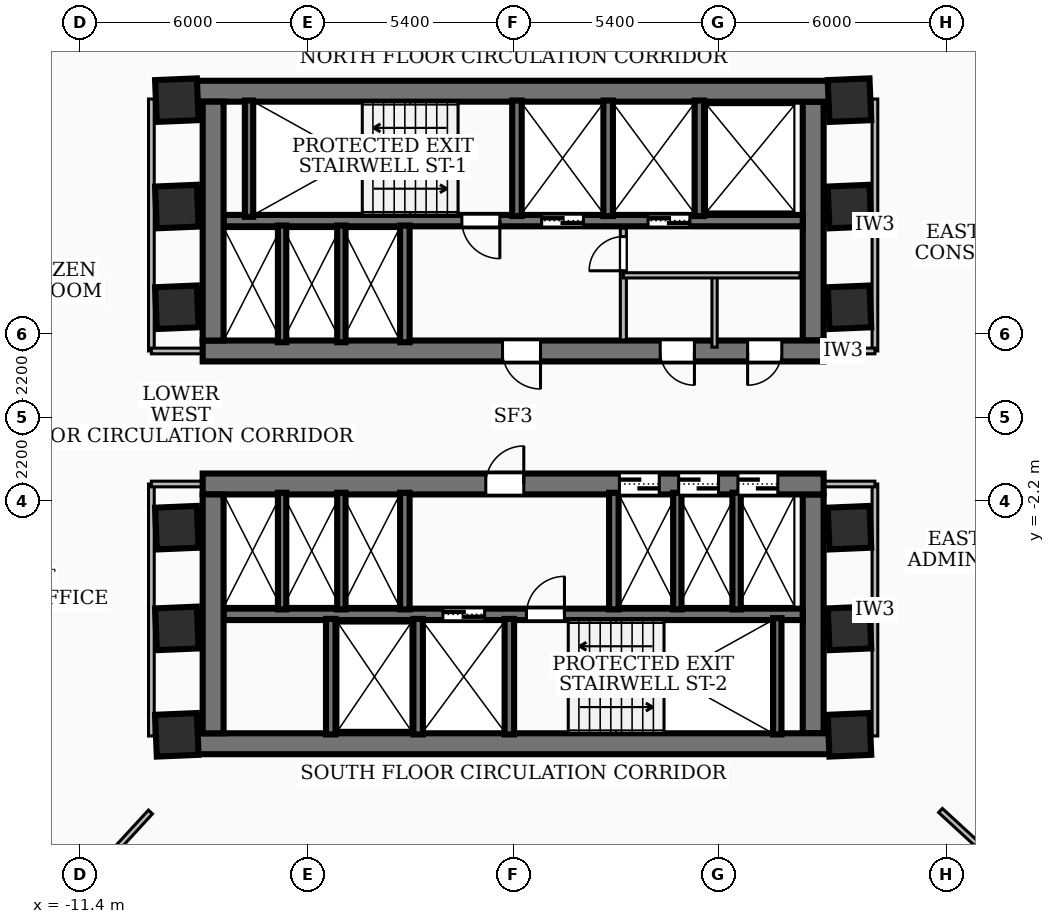
"""IFC4 building model, lengths in metres.
Left out: names, types, materials, properties, quantities, classifications, styles, units other than length and angle.
Written with IfcOpenShell. Run it as: python <this file> out.ifc"""

import sys

from ifc_helpers import new_model, si_unit, direction, frame, frame_2d, origin, origin_2d, place, context, subcontext, project, spatial, rectangle, extrude, element, fill, save


model = new_model("IFC4")
c1 = context("Model", 3, precision=1e-05, world=origin(), true_north=direction((0.0, 1.0)))
c2 = subcontext(c1, "Body", "Model", "MODEL_VIEW")
j1 = project(units=[si_unit("LENGTHUNIT", "METRE"), si_unit("PLANEANGLEUNIT", "RADIAN")], contexts=[c1])
p1 = place(None, origin())
s1 = spatial("IfcSite", under=j1, at=p1, CompositionType="ELEMENT")
p2 = place(p1, origin())
s2 = spatial("IfcBuilding", under=s1, at=p2, CompositionType="ELEMENT")
p3 = place(p2, frame((0.0, 0.0, 42.48)))
s3 = spatial("IfcBuildingStorey", under=s2, at=p3, CompositionType="ELEMENT", Elevation=42.48)
p4 = place(p3, frame((-8.78, 8.585, 0.0), z_axis=(0.0, 0.0, 1.0), x_axis=(1.0, 0.0, 0.0)))
e1 = element("IfcWall", 1, at=p4, inside=s3, PredefinedType="SHEAR", context=c2, shape_type="SweptSolid", body=[
    extrude(rectangle(XDim=17.56, YDim=0.55, at=frame_2d((8.78, 0.0))), origin(), (0.0, 0.0, 1.0), 3.34),
])
p5 = place(p3, frame((8.17, 1.75, 0.0), z_axis=(0.0, 0.0, 1.0), x_axis=(-1.0, 0.0, 0.0)))
e2 = element("IfcWall", 2, at=p5, inside=s3, PredefinedType="SHEAR", context=c2, shape_type="SweptSolid", body=[
    extrude(rectangle(XDim=16.34, YDim=0.55, at=frame_2d((8.17, 0.0))), origin(), (0.0, 0.0, 1.0), 3.34),
])
p6 = place(p5, frame((7.45, 0.0, 0.0)))
e3 = element("IfcOpeningElement", 3, at=p6, cuts=e2, PredefinedType="OPENING", context=c2, shape_type="SweptSolid", body=[
    extrude(rectangle(XDim=1.0, YDim=2.1, at=frame_2d((0.5, 1.05))), frame((0.0, 0.285, 0.0), z_axis=(0.0, -1.0, 0.0), x_axis=(1.0, 0.0, 0.0)), (0.0, 0.0, 1.0), 0.57),
])
p7 = place(p5, frame((3.4, 0.0, 0.0)))
e4 = element("IfcOpeningElement", 4, at=p7, cuts=e2, PredefinedType="OPENING", context=c2, shape_type="SweptSolid", body=[
    extrude(rectangle(XDim=0.9, YDim=2.06, at=frame_2d((0.45, 1.03))), frame((0.0, 0.285, 0.0), z_axis=(0.0, -1.0, 0.0), x_axis=(1.0, 0.0, 0.0)), (0.0, 0.0, 1.0), 0.57),
])
p8 = place(p5, frame((1.1, 0.0, 0.0)))
e5 = element("IfcOpeningElement", 5, at=p8, cuts=e2, PredefinedType="OPENING", context=c2, shape_type="SweptSolid", body=[
    extrude(rectangle(XDim=0.9, YDim=2.06, at=frame_2d((0.45, 1.03))), frame((0.0, 0.285, 0.0), z_axis=(0.0, -1.0, 0.0), x_axis=(1.0, 0.0, 0.0)), (0.0, 0.0, 1.0), 0.57),
])
for number, where, z_axis, x_axis in (
    (6, (-7.895, 2.025, 0.0), (0.0, 0.0, 1.0), (0.0, 1.0, 0.0)),
    (7, (7.895, 8.31, 0.0), (0.0, 0.0, 1.0), (0.0, -1.0, 0.0)),
):
    element("IfcWall", number, at=place(p3, frame(where, z_axis=z_axis, x_axis=x_axis)), inside=s3, PredefinedType="SHEAR", context=c2, shape_type="SweptSolid", body=[
        extrude(rectangle(XDim=6.285, YDim=0.55, at=frame_2d((3.143, 0.0))), origin(), (0.0, 0.0, 1.0), 3.34),
    ])
p9 = place(p3, frame((7.62, 5.18, 0.0), z_axis=(0.0, 0.0, 1.0), x_axis=(-1.0, 0.0, 0.0)))
e8 = element("IfcWall", 8, at=p9, inside=s3, PredefinedType="SOLIDWALL", context=c2, shape_type="SweptSolid", body=[
    extrude(rectangle(XDim=15.24, YDim=0.3, at=frame_2d((7.62, 0.0))), origin(), (0.0, 0.0, 1.0), 3.34),
])
p10 = place(p9, frame((5.77, 0.0, 0.0)))
e9 = element("IfcOpeningElement", 9, at=p10, cuts=e8, PredefinedType="OPENING", context=c2, shape_type="SweptSolid", body=[
    extrude(rectangle(XDim=1.1, YDim=2.15, at=frame_2d((0.55, 1.075))), frame((0.0, 0.16, 0.0), z_axis=(0.0, -1.0, 0.0), x_axis=(1.0, 0.0, 0.0)), (0.0, 0.0, 1.0), 0.32),
])
p11 = place(p9, frame((2.97, 0.0, 0.0)))
e10 = element("IfcOpeningElement", 10, at=p11, cuts=e8, PredefinedType="OPENING", context=c2, shape_type="SweptSolid", body=[
    extrude(rectangle(XDim=1.1, YDim=2.15, at=frame_2d((0.55, 1.075))), frame((0.0, 0.16, 0.0), z_axis=(0.0, -1.0, 0.0), x_axis=(1.0, 0.0, 0.0)), (0.0, 0.0, 1.0), 0.32),
])
p12 = place(p9, frame((7.97, 0.0, 0.0)))
e11 = element("IfcOpeningElement", 11, at=p12, cuts=e8, PredefinedType="OPENING", context=c2, shape_type="SweptSolid", body=[
    extrude(rectangle(XDim=1.0, YDim=2.1, at=frame_2d((0.5, 1.05))), frame((0.0, 0.16, 0.0), z_axis=(0.0, -1.0, 0.0), x_axis=(1.0, 0.0, 0.0)), (0.0, 0.0, 1.0), 0.32),
])
p13 = place(p3, frame((8.78, -8.585, 0.0), z_axis=(0.0, 0.0, 1.0), x_axis=(-1.0, 0.0, 0.0)))
e12 = element("IfcWall", 12, at=p13, inside=s3, PredefinedType="SHEAR", context=c2, shape_type="SweptSolid", body=[
    extrude(rectangle(XDim=17.56, YDim=0.55, at=frame_2d((8.78, 0.0))), origin(), (0.0, 0.0, 1.0), 3.34),
])
p14 = place(p3, frame((-8.17, -1.75, 0.0), z_axis=(0.0, 0.0, 1.0), x_axis=(1.0, 0.0, 0.0)))
e13 = element("IfcWall", 13, at=p14, inside=s3, PredefinedType="SHEAR", context=c2, shape_type="SweptSolid", body=[
    extrude(rectangle(XDim=16.34, YDim=0.55, at=frame_2d((8.17, 0.0))), origin(), (0.0, 0.0, 1.0), 3.34),
])
p15 = place(p14, frame((7.45, 0.0, 0.0)))
e14 = element("IfcOpeningElement", 14, at=p15, cuts=e13, PredefinedType="OPENING", context=c2, shape_type="SweptSolid", body=[
    extrude(rectangle(XDim=1.0, YDim=2.1, at=frame_2d((0.5, 1.05))), frame((0.0, 0.285, 0.0), z_axis=(0.0, -1.0, 0.0), x_axis=(1.0, 0.0, 0.0)), (0.0, 0.0, 1.0), 0.57),
])
p16 = place(p14, frame((10.965, 0.0, 0.0)))
e15 = element("IfcOpeningElement", 15, at=p16, cuts=e13, PredefinedType="OPENING", context=c2, shape_type="SweptSolid", body=[
    extrude(rectangle(XDim=1.05, YDim=2.15, at=frame_2d((0.525, 1.075))), frame((0.0, 0.285, 0.0), z_axis=(0.0, -1.0, 0.0), x_axis=(1.0, 0.0, 0.0)), (0.0, 0.0, 1.0), 0.57),
])
p17 = place(p14, frame((12.525, 0.0, 0.0)))
e16 = element("IfcOpeningElement", 16, at=p17, cuts=e13, PredefinedType="OPENING", context=c2, shape_type="SweptSolid", body=[
    extrude(rectangle(XDim=1.05, YDim=2.15, at=frame_2d((0.525, 1.075))), frame((0.0, 0.285, 0.0), z_axis=(0.0, -1.0, 0.0), x_axis=(1.0, 0.0, 0.0)), (0.0, 0.0, 1.0), 0.57),
])
p18 = place(p14, frame((14.085, 0.0, 0.0)))
e17 = element("IfcOpeningElement", 17, at=p18, cuts=e13, PredefinedType="OPENING", context=c2, shape_type="SweptSolid", body=[
    extrude(rectangle(XDim=1.05, YDim=2.15, at=frame_2d((0.525, 1.075))), frame((0.0, 0.285, 0.0), z_axis=(0.0, -1.0, 0.0), x_axis=(1.0, 0.0, 0.0)), (0.0, 0.0, 1.0), 0.57),
])
for number, where, z_axis, x_axis in (
    (18, (-7.895, -8.31, 0.0), (0.0, 0.0, 1.0), (0.0, 1.0, 0.0)),
    (19, (7.895, -2.025, 0.0), (0.0, 0.0, 1.0), (0.0, -1.0, 0.0)),
):
    element("IfcWall", number, at=place(p3, frame(where, z_axis=z_axis, x_axis=x_axis)), inside=s3, PredefinedType="SHEAR", context=c2, shape_type="SweptSolid", body=[
        extrude(rectangle(XDim=6.285, YDim=0.55, at=frame_2d((3.143, 0.0))), origin(), (0.0, 0.0, 1.0), 3.34),
    ])
p19 = place(p3, frame((-7.62, -5.18, 0.0), z_axis=(0.0, 0.0, 1.0), x_axis=(1.0, 0.0, 0.0)))
e20 = element("IfcWall", 20, at=p19, inside=s3, PredefinedType="SOLIDWALL", context=c2, shape_type="SweptSolid", body=[
    extrude(rectangle(XDim=15.24, YDim=0.3, at=frame_2d((7.62, 0.0))), origin(), (0.0, 0.0, 1.0), 3.34),
])
p20 = place(p19, frame((5.77, 0.0, 0.0)))
e21 = element("IfcOpeningElement", 21, at=p20, cuts=e20, PredefinedType="OPENING", context=c2, shape_type="SweptSolid", body=[
    extrude(rectangle(XDim=1.1, YDim=2.15, at=frame_2d((0.55, 1.075))), frame((0.0, 0.16, 0.0), z_axis=(0.0, -1.0, 0.0), x_axis=(1.0, 0.0, 0.0)), (0.0, 0.0, 1.0), 0.32),
])
p21 = place(p19, frame((7.97, 0.0, 0.0)))
e22 = element("IfcOpeningElement", 22, at=p21, cuts=e20, PredefinedType="OPENING", context=c2, shape_type="SweptSolid", body=[
    extrude(rectangle(XDim=1.0, YDim=2.1, at=frame_2d((0.5, 1.05))), frame((0.0, 0.16, 0.0), z_axis=(0.0, -1.0, 0.0), x_axis=(1.0, 0.0, 0.0)), (0.0, 0.0, 1.0), 0.32),
])
for number, where, z_axis, x_axis in (
    (23, (-6.95, 5.28, 0.0), (0.0, 0.0, 1.0), (0.0, 1.0, 0.0)),
    (24, (6.95, -8.34, 0.0), (0.0, 0.0, 1.0), (0.0, 1.0, 0.0)),
):
    element("IfcWall", number, at=place(p3, frame(where, z_axis=z_axis, x_axis=x_axis)), inside=s3, PredefinedType="SOLIDWALL", context=c2, shape_type="SweptSolid", body=[
        extrude(rectangle(XDim=3.06, YDim=0.22, at=frame_2d((1.53, 0.0))), origin(), (0.0, 0.0, 1.0), 3.34),
    ])
for number, where, z_axis, x_axis in (
    (25, (0.1, 5.3, 0.0), (0.0, 0.0, 1.0), (0.0, 1.0, 0.0)),
    (26, (2.5, 5.3, 0.0), (0.0, 0.0, 1.0), (0.0, 1.0, 0.0)),
    (27, (4.9, 5.3, 0.0), (0.0, 0.0, 1.0), (0.0, 1.0, 0.0)),
):
    element("IfcWall", number, at=place(p3, frame(where, z_axis=z_axis, x_axis=x_axis)), inside=s3, PredefinedType="SOLIDWALL", context=c2, shape_type="SweptSolid", body=[
        extrude(rectangle(XDim=3.04, YDim=0.25, at=frame_2d((1.52, 0.0))), origin(), (0.0, 0.0, 1.0), 3.34),
    ])
p22 = place(p3, frame((-2.85, 1.98, 0.0), z_axis=(0.0, 0.0, 1.0), x_axis=(0.0, 1.0, 0.0)))
e28 = element("IfcWall", 28, at=p22, inside=s3, PredefinedType="SOLIDWALL", context=c2, shape_type="SweptSolid", body=[
    extrude(rectangle(XDim=3.07, YDim=0.25, at=frame_2d((1.535, 0.0))), origin(), (0.0, 0.0, 1.0), 3.34),
])
for number, where, z_axis, x_axis in (
    (29, (-0.1, -8.34, 0.0), (0.0, 0.0, 1.0), (0.0, 1.0, 0.0)),
    (30, (-2.5, -8.34, 0.0), (0.0, 0.0, 1.0), (0.0, 1.0, 0.0)),
    (31, (-4.8, -8.34, 0.0), (0.0, 0.0, 1.0), (0.0, 1.0, 0.0)),
):
    element("IfcWall", number, at=place(p3, frame(where, z_axis=z_axis, x_axis=x_axis)), inside=s3, PredefinedType="SOLIDWALL", context=c2, shape_type="SweptSolid", body=[
        extrude(rectangle(XDim=3.04, YDim=0.25, at=frame_2d((1.52, 0.0))), origin(), (0.0, 0.0, 1.0), 3.34),
    ])
for number, where, z_axis, x_axis in (
    (32, (-2.85, -5.05, 0.0), (0.0, 0.0, 1.0), (0.0, 1.0, 0.0)),
    (33, (2.65, -5.05, 0.0), (0.0, 0.0, 1.0), (0.0, 1.0, 0.0)),
):
    element("IfcWall", number, at=place(p3, frame(where, z_axis=z_axis, x_axis=x_axis)), inside=s3, PredefinedType="SOLIDWALL", context=c2, shape_type="SweptSolid", body=[
        extrude(rectangle(XDim=3.07, YDim=0.25, at=frame_2d((1.535, 0.0))), origin(), (0.0, 0.0, 1.0), 3.34),
    ])
for number, where, z_axis, x_axis in (
    (34, (-6.08, 1.98, 0.0), (0.0, 0.0, 1.0), (0.0, 1.0, 0.0)),
    (35, (-4.52, 1.98, 0.0), (0.0, 0.0, 1.0), (0.0, 1.0, 0.0)),
    (36, (4.32, -5.05, 0.0), (0.0, 0.0, 1.0), (0.0, 1.0, 0.0)),
    (37, (5.88, -5.05, 0.0), (0.0, 0.0, 1.0), (0.0, 1.0, 0.0)),
    (38, (-6.08, -5.05, 0.0), (0.0, 0.0, 1.0), (0.0, 1.0, 0.0)),
    (39, (-4.52, -5.05, 0.0), (0.0, 0.0, 1.0), (0.0, 1.0, 0.0)),
):
    element("IfcWall", number, at=place(p3, frame(where, z_axis=z_axis, x_axis=x_axis)), inside=s3, PredefinedType="SOLIDWALL", context=c2, shape_type="SweptSolid", body=[
        extrude(rectangle(XDim=3.07, YDim=0.22, at=frame_2d((1.535, 0.0))), origin(), (0.0, 0.0, 1.0), 3.34),
    ])
for number, where, z_axis, x_axis in (
    (40, (-8.85, -5.55, 0.0), (0.0, 0.0, 1.0), (0.999, 0.042, 0.0)),
    (41, (-8.85, -2.9, 0.0), (0.0, 0.0, 1.0), (0.999, 0.042, 0.0)),
    (42, (-8.85, 2.9, 0.0), (0.0, 0.0, 1.0), (0.999, 0.042, 0.0)),
    (43, (-8.85, 5.55, 0.0), (0.0, 0.0, 1.0), (0.999, 0.042, 0.0)),
    (44, (8.85, -5.55, 0.0), (0.0, 0.0, 1.0), (0.999, 0.042, 0.0)),
    (45, (8.85, -2.9, 0.0), (0.0, 0.0, 1.0), (0.999, 0.042, 0.0)),
    (46, (8.85, 2.9, 0.0), (0.0, 0.0, 1.0), (0.999, 0.042, 0.0)),
    (47, (8.85, 5.55, 0.0), (0.0, 0.0, 1.0), (0.999, 0.042, 0.0)),
    (48, (-8.85, 8.35, 0.0), (0.0, 0.0, 1.0), (0.999, 0.042, 0.0)),
    (49, (8.85, -8.35, 0.0), (0.0, 0.0, 1.0), (0.999, 0.042, 0.0)),
    (50, (8.85, 8.35, 0.0), (0.0, 0.0, 1.0), (0.999, 0.042, 0.0)),
    (51, (-8.85, -8.35, 0.0), (0.0, 0.0, 1.0), (0.999, 0.042, 0.0)),
):
    element("IfcColumn", number, at=place(p3, frame(where, z_axis=z_axis, x_axis=x_axis)), inside=s3, PredefinedType="COLUMN", context=c2, shape_type="SweptSolid", body=[
        extrude(rectangle(XDim=1.1, YDim=1.1, at=origin_2d()), origin(), (0.0, 0.0, 1.0), 3.6),
    ])
p23 = place(p3, frame((2.9, 2.04, 0.0), z_axis=(0.0, 0.0, 1.0), x_axis=(0.0, 1.0, 0.0)))
e52 = element("IfcWall", 52, at=p23, inside=s3, PredefinedType="PARTITIONING", context=c2, shape_type="SweptSolid", body=[
    extrude(rectangle(XDim=2.94, YDim=0.16, at=frame_2d((1.47, 0.0))), origin(), (0.0, 0.0, 1.0), 2.405),
])
p24 = place(p23, frame((1.82, 0.0, 0.0)))
e53 = element("IfcOpeningElement", 53, at=p24, cuts=e52, PredefinedType="OPENING", context=c2, shape_type="SweptSolid", body=[
    extrude(rectangle(XDim=0.9, YDim=2.06, at=frame_2d((0.45, 1.03))), frame((0.0, 0.09, 0.0), z_axis=(0.0, -1.0, 0.0), x_axis=(1.0, 0.0, 0.0)), (0.0, 0.0, 1.0), 0.18),
])
p25 = place(p3, frame((2.9, 3.74, 0.0), z_axis=(0.0, 0.0, 1.0), x_axis=(1.0, 0.0, 0.0)))
e54 = element("IfcWall", 54, at=p25, inside=s3, PredefinedType="PARTITIONING", context=c2, shape_type="SweptSolid", body=[
    extrude(rectangle(XDim=4.65, YDim=0.138, at=frame_2d((2.325, 0.0))), origin(), (0.0, 0.0, 1.0), 3.34),
])
p26 = place(p3, frame((5.3, 1.85, 0.0), z_axis=(0.0, 0.0, 1.0), x_axis=(0.0, 1.0, 0.0)))
e55 = element("IfcWall", 55, at=p26, inside=s3, PredefinedType="PARTITIONING", context=c2, shape_type="SweptSolid", body=[
    extrude(rectangle(XDim=1.89, YDim=0.138, at=frame_2d((0.945, 0.0))), origin(), (0.0, 0.0, 1.0), 2.405),
])
p27 = place(p3, frame((-9.52, 1.75, 0.0), z_axis=(0.0, 0.0, 1.0), x_axis=(0.0, 1.0, 0.0)))
e56 = element("IfcWall", 56, at=p27, inside=s3, PredefinedType="PARTITIONING", context=c2, shape_type="SweptSolid", body=[
    extrude(rectangle(XDim=6.63, YDim=0.15, at=frame_2d((3.315, 0.0))), origin(), (0.0, 0.0, 1.0), 2.421),
])
p28 = place(p3, frame((-7.85, 1.75, 0.0), z_axis=(0.0, 0.0, 1.0), x_axis=(-1.0, 0.0, 0.0)))
e57 = element("IfcWall", 57, at=p28, inside=s3, PredefinedType="PARTITIONING", context=c2, shape_type="SweptSolid", body=[
    extrude(rectangle(XDim=1.67, YDim=0.15, at=frame_2d((0.835, 0.0))), origin(), (0.0, 0.0, 1.0), 2.405),
])
p29 = place(p3, frame((-9.52, -8.38, 0.0), z_axis=(0.0, 0.0, 1.0), x_axis=(0.0, 1.0, 0.0)))
e58 = element("IfcWall", 58, at=p29, inside=s3, PredefinedType="PARTITIONING", context=c2, shape_type="SweptSolid", body=[
    extrude(rectangle(XDim=6.63, YDim=0.15, at=frame_2d((3.315, 0.0))), origin(), (0.0, 0.0, 1.0), 2.421),
])
p30 = place(p3, frame((-7.85, -1.75, 0.0), z_axis=(0.0, 0.0, 1.0), x_axis=(-1.0, 0.0, 0.0)))
e59 = element("IfcWall", 59, at=p30, inside=s3, PredefinedType="PARTITIONING", context=c2, shape_type="SweptSolid", body=[
    extrude(rectangle(XDim=1.67, YDim=0.15, at=frame_2d((0.835, 0.0))), origin(), (0.0, 0.0, 1.0), 2.405),
])
p31 = place(p3, frame((9.52, 1.75, 0.0), z_axis=(0.0, 0.0, 1.0), x_axis=(0.0, 1.0, 0.0)))
e60 = element("IfcWall", 60, at=p31, inside=s3, PredefinedType="PARTITIONING", context=c2, shape_type="SweptSolid", body=[
    extrude(rectangle(XDim=6.63, YDim=0.15, at=frame_2d((3.315, 0.0))), origin(), (0.0, 0.0, 1.0), 2.421),
])
p32 = place(p3, frame((7.85, 1.75, 0.0), z_axis=(0.0, 0.0, 1.0), x_axis=(1.0, 0.0, 0.0)))
e61 = element("IfcWall", 61, at=p32, inside=s3, PredefinedType="PARTITIONING", context=c2, shape_type="SweptSolid", body=[
    extrude(rectangle(XDim=1.67, YDim=0.15, at=frame_2d((0.835, 0.0))), origin(), (0.0, 0.0, 1.0), 2.405),
])
p33 = place(p3, frame((9.52, -8.38, 0.0), z_axis=(0.0, 0.0, 1.0), x_axis=(0.0, 1.0, 0.0)))
e62 = element("IfcWall", 62, at=p33, inside=s3, PredefinedType="PARTITIONING", context=c2, shape_type="SweptSolid", body=[
    extrude(rectangle(XDim=6.63, YDim=0.15, at=frame_2d((3.315, 0.0))), origin(), (0.0, 0.0, 1.0), 2.421),
])
p34 = place(p3, frame((7.85, -1.75, 0.0), z_axis=(0.0, 0.0, 1.0), x_axis=(1.0, 0.0, 0.0)))
e63 = element("IfcWall", 63, at=p34, inside=s3, PredefinedType="PARTITIONING", context=c2, shape_type="SweptSolid", body=[
    extrude(rectangle(XDim=1.67, YDim=0.15, at=frame_2d((0.835, 0.0))), origin(), (0.0, 0.0, 1.0), 2.405),
])
p35 = place(p3, frame((-9.544, -10.38, 0.0), z_axis=(0.0, 0.0, 1.0), x_axis=(-0.676856513188, -0.736114977809, 0.0)))
e64 = element("IfcWall", 64, at=p35, inside=s3, PredefinedType="PARTITIONING", context=c2, shape_type="SweptSolid", body=[
    extrude(rectangle(XDim=5.554, YDim=0.145, at=frame_2d((2.777, 0.0))), origin(), (0.0, 0.0, 1.0), 3.34),
])
p36 = place(p3, frame((11.245, -10.34, 0.0), z_axis=(0.0, 0.0, 1.0), x_axis=(0.736178820698, -0.676787074312, 0.0)))
e65 = element("IfcWall", 65, at=p36, inside=s3, PredefinedType="PARTITIONING", context=c2, shape_type="SweptSolid", body=[
    extrude(rectangle(XDim=4.378, YDim=0.145, at=frame_2d((2.189, 0.0))), origin(), (0.0, 0.0, 1.0), 3.34),
])
p37 = place(p6, origin())
e66 = element("IfcDoor", 66, at=p37, inside=s3, OperationType="SINGLE_SWING_LEFT", PredefinedType="DOOR", context=c2, shape_type="SweptSolid", body=[
    extrude(rectangle(XDim=1.0, YDim=2.1, at=frame_2d((0.5, 1.05))), frame((0.0, 0.025, 0.0), z_axis=(0.0, -1.0, 0.0), x_axis=(1.0, 0.0, 0.0)), (0.0, 0.0, 1.0), 0.05),
])
fill(e3, e66)
p38 = place(p15, origin())
e67 = element("IfcDoor", 67, at=p38, inside=s3, OperationType="SINGLE_SWING_RIGHT", PredefinedType="DOOR", context=c2, shape_type="SweptSolid", body=[
    extrude(rectangle(XDim=1.0, YDim=2.1, at=frame_2d((0.5, 1.05))), frame((0.0, 0.025, 0.0), z_axis=(0.0, -1.0, 0.0), x_axis=(1.0, 0.0, 0.0)), (0.0, 0.0, 1.0), 0.05),
])
fill(e14, e67)
p39 = place(p10, origin())
e68 = element("IfcDoor", 68, at=p39, inside=s3, OperationType="DOUBLE_DOOR_SLIDING", PredefinedType="DOOR", context=c2, shape_type="SweptSolid", body=[
    extrude(rectangle(XDim=1.1, YDim=2.15, at=frame_2d((0.55, 1.075))), frame((0.0, 0.025, 0.0), z_axis=(0.0, -1.0, 0.0), x_axis=(1.0, 0.0, 0.0)), (0.0, 0.0, 1.0), 0.05),
])
fill(e9, e68)
p40 = place(p11, origin())
e69 = element("IfcDoor", 69, at=p40, inside=s3, OperationType="DOUBLE_DOOR_SLIDING", PredefinedType="DOOR", context=c2, shape_type="SweptSolid", body=[
    extrude(rectangle(XDim=1.1, YDim=2.15, at=frame_2d((0.55, 1.075))), frame((0.0, 0.025, 0.0), z_axis=(0.0, -1.0, 0.0), x_axis=(1.0, 0.0, 0.0)), (0.0, 0.0, 1.0), 0.05),
])
fill(e10, e69)
p41 = place(p12, origin())
e70 = element("IfcDoor", 70, at=p41, inside=s3, OperationType="SINGLE_SWING_LEFT", PredefinedType="DOOR", context=c2, shape_type="SweptSolid", body=[
    extrude(rectangle(XDim=1.0, YDim=2.1, at=frame_2d((0.5, 1.05))), frame((0.0, 0.025, 0.0), z_axis=(0.0, -1.0, 0.0), x_axis=(1.0, 0.0, 0.0)), (0.0, 0.0, 1.0), 0.05),
])
fill(e11, e70)
p42 = place(p20, origin())
e71 = element("IfcDoor", 71, at=p42, inside=s3, OperationType="DOUBLE_DOOR_SLIDING", PredefinedType="DOOR", context=c2, shape_type="SweptSolid", body=[
    extrude(rectangle(XDim=1.1, YDim=2.15, at=frame_2d((0.55, 1.075))), frame((0.0, 0.025, 0.0), z_axis=(0.0, -1.0, 0.0), x_axis=(1.0, 0.0, 0.0)), (0.0, 0.0, 1.0), 0.05),
])
fill(e21, e71)
p43 = place(p21, origin())
e72 = element("IfcDoor", 72, at=p43, inside=s3, OperationType="SINGLE_SWING_RIGHT", PredefinedType="DOOR", context=c2, shape_type="SweptSolid", body=[
    extrude(rectangle(XDim=1.0, YDim=2.1, at=frame_2d((0.5, 1.05))), frame((0.0, 0.025, 0.0), z_axis=(0.0, -1.0, 0.0), x_axis=(1.0, 0.0, 0.0)), (0.0, 0.0, 1.0), 0.05),
])
fill(e22, e72)
p44 = place(p16, origin())
e73 = element("IfcDoor", 73, at=p44, inside=s3, OperationType="DOUBLE_DOOR_SLIDING", PredefinedType="DOOR", context=c2, shape_type="SweptSolid", body=[
    extrude(rectangle(XDim=1.05, YDim=2.15, at=frame_2d((0.525, 1.075))), frame((0.0, 0.025, 0.0), z_axis=(0.0, -1.0, 0.0), x_axis=(1.0, 0.0, 0.0)), (0.0, 0.0, 1.0), 0.05),
])
fill(e15, e73)
p45 = place(p17, origin())
e74 = element("IfcDoor", 74, at=p45, inside=s3, OperationType="DOUBLE_DOOR_SLIDING", PredefinedType="DOOR", context=c2, shape_type="SweptSolid", body=[
    extrude(rectangle(XDim=1.05, YDim=2.15, at=frame_2d((0.525, 1.075))), frame((0.0, 0.025, 0.0), z_axis=(0.0, -1.0, 0.0), x_axis=(1.0, 0.0, 0.0)), (0.0, 0.0, 1.0), 0.05),
])
fill(e16, e74)
p46 = place(p18, origin())
e75 = element("IfcDoor", 75, at=p46, inside=s3, OperationType="DOUBLE_DOOR_SLIDING", PredefinedType="DOOR", context=c2, shape_type="SweptSolid", body=[
    extrude(rectangle(XDim=1.05, YDim=2.15, at=frame_2d((0.525, 1.075))), frame((0.0, 0.025, 0.0), z_axis=(0.0, -1.0, 0.0), x_axis=(1.0, 0.0, 0.0)), (0.0, 0.0, 1.0), 0.05),
])
fill(e17, e75)
p47 = place(p7, origin())
e76 = element("IfcDoor", 76, at=p47, inside=s3, OperationType="SINGLE_SWING_LEFT", PredefinedType="DOOR", context=c2, shape_type="SweptSolid", body=[
    extrude(rectangle(XDim=0.9, YDim=2.06, at=frame_2d((0.45, 1.03))), frame((0.0, 0.025, 0.0), z_axis=(0.0, -1.0, 0.0), x_axis=(1.0, 0.0, 0.0)), (0.0, 0.0, 1.0), 0.05),
])
fill(e4, e76)
p48 = place(p8, origin())
e77 = element("IfcDoor", 77, at=p48, inside=s3, OperationType="SINGLE_SWING_RIGHT", PredefinedType="DOOR", context=c2, shape_type="SweptSolid", body=[
    extrude(rectangle(XDim=0.9, YDim=2.06, at=frame_2d((0.45, 1.03))), frame((0.0, 0.025, 0.0), z_axis=(0.0, -1.0, 0.0), x_axis=(1.0, 0.0, 0.0)), (0.0, 0.0, 1.0), 0.05),
])
fill(e5, e77)
p49 = place(p24, origin())
e78 = element("IfcDoor", 78, at=p49, inside=s3, OperationType="SINGLE_SWING_LEFT", PredefinedType="DOOR", context=c2, shape_type="SweptSolid", body=[
    extrude(rectangle(XDim=0.9, YDim=2.06, at=frame_2d((0.45, 1.03))), frame((0.0, 0.025, 0.0), z_axis=(0.0, -1.0, 0.0), x_axis=(1.0, 0.0, 0.0)), (0.0, 0.0, 1.0), 0.05),
])
fill(e53, e78)
save(model, sys.argv[1])
